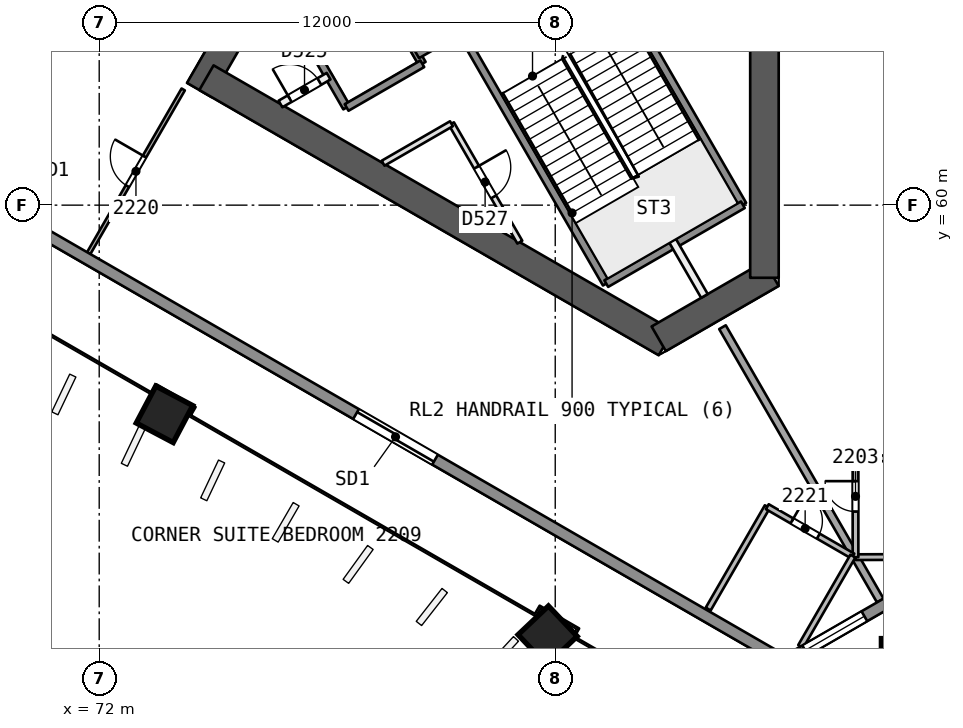
"""IFC4 building model, lengths in metres.
Left out: names, types, materials, properties, quantities, classifications, styles, units other than length and angle.
Written with IfcOpenShell. Run it as: python <this file> out.ifc"""

import sys

from ifc_helpers import new_model, si_unit, direction, frame, frame_2d, origin, origin_2d, place, context, subcontext, project, spatial, rectangle, extrude, element, fill, save


model = new_model("IFC4")
c1 = context("Model", 3, precision=1e-05, world=origin(), true_north=direction((0.0, 1.0)))
c2 = subcontext(c1, "Body", "Model", "MODEL_VIEW")
j1 = project(units=[si_unit("LENGTHUNIT", "METRE"), si_unit("PLANEANGLEUNIT", "RADIAN")], contexts=[c1])
p1 = place(None, origin())
s1 = spatial("IfcSite", under=j1, at=p1, CompositionType="ELEMENT")
p2 = place(p1, origin())
s2 = spatial("IfcBuilding", under=s1, at=p2, CompositionType="ELEMENT")
p3 = place(p2, frame((0.0, 0.0, 94.3)))
s3 = spatial("IfcBuildingStorey", under=s2, at=p3, CompositionType="ELEMENT", Elevation=94.3)
p4 = place(p3, frame((79.717, 71.831, 0.0), z_axis=(0.0, 0.0, 1.0), x_axis=(-0.499996230114, -0.866027580318, 0.0)))
e1 = element("IfcWall", 1, at=p4, inside=s3, PredefinedType="SHEAR", context=c2, shape_type="SweptSolid", body=[
    extrude(rectangle(XDim=10.164, YDim=0.75, at=frame_2d((5.082, 0.0))), origin(), (0.0, 0.0, 1.0), 3.7),
])
p5 = place(p4, frame((0.733, 0.0, 0.0)))
e2 = element("IfcOpeningElement", 2, at=p5, cuts=e1, PredefinedType="OPENING", context=c2, shape_type="SweptSolid", body=[
    extrude(rectangle(XDim=1.2, YDim=2.1, at=frame_2d((0.6, 1.05))), frame((0.0, 0.385, 0.0), z_axis=(0.0, -1.0, 0.0), x_axis=(1.0, 0.0, 0.0)), (0.0, 0.0, 1.0), 0.771),
])
p6 = place(p3, frame((74.822, 63.354, 0.0), z_axis=(0.0, 0.0, 1.0), x_axis=(0.8660248072, -0.500001033313, 0.0)))
e3 = element("IfcWall", 3, at=p6, inside=s3, PredefinedType="SHEAR", context=c2, shape_type="SweptSolid", body=[
    extrude(rectangle(XDim=13.958, YDim=0.75, at=frame_2d((6.979, 0.0))), origin(), (0.0, 0.0, 1.0), 3.7),
])
p7 = place(p3, frame((86.723, 56.483, 0.0), z_axis=(0.0, 0.0, 1.0), x_axis=(0.866017201164, 0.500014207086, 0.0)))
e4 = element("IfcWall", 4, at=p7, inside=s3, PredefinedType="SHEAR", context=c2, shape_type="SweptSolid", body=[
    extrude(rectangle(XDim=3.429, YDim=0.75, at=frame_2d((1.714, 0.0))), origin(), (0.0, 0.0, 1.0), 3.7),
])
p8 = place(p3, frame((89.505, 58.089, 0.0), z_axis=(0.0, 0.0, 1.0), x_axis=(0.0, 1.0, 0.0)))
e5 = element("IfcWall", 5, at=p8, inside=s3, PredefinedType="SHEAR", context=c2, shape_type="SweptSolid", body=[
    extrude(rectangle(XDim=14.117, YDim=0.75, at=frame_2d((7.059, 0.0))), origin(), (0.0, 0.0, 1.0), 3.7),
])
p9 = place(p3, frame((73.717, 54.469, 0.0), z_axis=(0.000857580205, 0.022758859284, 0.9997406158), x_axis=(-0.500022930451, -0.86577798761, 0.020138152677)))
e6 = element("IfcColumn", 6, at=p9, inside=s3, PredefinedType="COLUMN", context=c2, shape_type="SweptSolid", body=[
    extrude(rectangle(XDim=1.1, YDim=1.1, at=origin_2d()), origin(), (0.0, 0.0, 1.0), 3.701),
])
p10 = place(p3, frame((83.81, 48.642, 0.0), z_axis=(-0.00837646992, 0.028097450282, 0.999570091609), x_axis=(-0.49967642562, -0.865977626468, 0.020154903518)))
e7 = element("IfcColumn", 7, at=p10, inside=s3, PredefinedType="COLUMN", context=c2, shape_type="SweptSolid", body=[
    extrude(rectangle(XDim=1.1, YDim=1.1, at=origin_2d()), origin(), (0.0, 0.0, 1.0), 3.702),
])
p11 = place(p3, frame((93.903, 47.259, 0.0), z_axis=(-0.017607037296, 0.030466109479, 0.999380712447), x_axis=(0.500061328599, -0.865274797998, 0.035187946645)))
e8 = element("IfcColumn", 8, at=p11, inside=s3, PredefinedType="COLUMN", context=c2, shape_type="SweptSolid", body=[
    extrude(rectangle(XDim=2.6, YDim=2.6, at=origin_2d()), origin(), (0.0, 0.0, 1.0), 3.702),
])
p12 = place(p3, frame((94.545, 50.747, 0.0), z_axis=(0.0, 0.0, 1.0), x_axis=(-0.999994472164, -0.003325002401, 0.0)))
e9 = element("IfcWall", 9, at=p12, inside=s3, PredefinedType="PARTITIONING", context=c2, shape_type="SweptSolid", body=[
    extrude(rectangle(XDim=2.643, YDim=0.15, at=frame_2d((1.322, 0.0))), origin(), (0.0, 0.0, 1.0), 3.25),
])
p13 = place(p3, frame((91.902, 50.738, 0.0), z_axis=(0.0, 0.0, 1.0), x_axis=(0.0, 1.0, 0.0)))
e10 = element("IfcWall", 10, at=p13, inside=s3, PredefinedType="PARTITIONING", context=c2, shape_type="SweptSolid", body=[
    extrude(rectangle(XDim=2.6, YDim=0.15, at=frame_2d((1.3, 0.0))), origin(), (0.0, 0.0, 1.0), 3.25),
])
p14 = place(p13, frame((1.2, 0.0, 0.0)))
e11 = element("IfcOpeningElement", 11, at=p14, cuts=e10, PredefinedType="OPENING", context=c2, shape_type="SweptSolid", body=[
    extrude(rectangle(XDim=0.8, YDim=2.1, at=frame_2d((0.4, 1.05))), frame((0.0, 0.085, 0.0), z_axis=(0.0, -1.0, 0.0), x_axis=(1.0, 0.0, 0.0)), (0.0, 0.0, 1.0), 0.171),
])
p15 = place(p3, frame((91.902, 53.338, 0.0), z_axis=(0.0, 0.0, 1.0), x_axis=(1.0, 0.0, 0.0)))
e12 = element("IfcWall", 12, at=p15, inside=s3, PredefinedType="PARTITIONING", context=c2, shape_type="SweptSolid", body=[
    extrude(rectangle(XDim=3.11, YDim=0.15, at=frame_2d((1.555, 0.0))), origin(), (0.0, 0.0, 1.0), 3.25),
])
p16 = place(p3, frame((88.401, 56.789, 0.0), z_axis=(0.0, 0.0, 1.0), x_axis=(0.499996437432, -0.866027460624, 0.0)))
e13 = element("IfcWall", 13, at=p16, inside=s3, PredefinedType="PARTITIONING", context=c2, shape_type="SweptSolid", body=[
    extrude(rectangle(XDim=8.305, YDim=0.2, at=frame_2d((4.152, 0.0))), origin(), (0.0, 0.0, 1.0), 3.25),
])
for number, where, z_axis, x_axis in (
    (14, (64.974, 62.634, 0.0), (0.0, 0.0, 1.0), (0.5, 0.866, 0.0)),
    (15, (67.674, 61.075, 0.0), (0.0, 0.0, 1.0), (0.5, 0.866, 0.0)),
):
    element("IfcWall", number, at=place(p3, frame(where, z_axis=z_axis, x_axis=x_axis)), inside=s3, PredefinedType="PARTITIONING", context=c2, shape_type="SweptSolid", body=[
        extrude(rectangle(XDim=12.953, YDim=0.2, at=frame_2d((6.477, 0.0))), origin(), (0.0, 0.0, 1.0), 3.25),
    ])
p17 = place(p3, frame((71.724, 58.737, 0.0), z_axis=(0.0, 0.0, 1.0), x_axis=(0.499971721724, 0.866041729639, 0.0)))
e16 = element("IfcWall", 16, at=p17, inside=s3, PredefinedType="PARTITIONING", context=c2, shape_type="SweptSolid", body=[
    extrude(rectangle(XDim=4.974, YDim=0.1, at=frame_2d((2.487, 0.0))), origin(), (0.0, 0.0, 1.0), 3.25),
])
p18 = place(p17, frame((2.037, 0.0, 0.0)))
e17 = element("IfcOpeningElement", 17, at=p18, cuts=e16, PredefinedType="OPENING", context=c2, shape_type="SweptSolid", body=[
    extrude(rectangle(XDim=0.9, YDim=2.1, at=frame_2d((0.45, 1.05))), frame((0.0, 0.061, 0.0), z_axis=(0.0, -1.0, 0.0), x_axis=(1.0, 0.0, 0.0)), (0.0, 0.0, 1.0), 0.121),
])
p19 = place(p3, frame((88.025, 49.372, 0.0), z_axis=(0.0, 0.0, 1.0), x_axis=(0.500005562063, 0.866022192502, 0.0)))
e18 = element("IfcWall", 18, at=p19, inside=s3, PredefinedType="PARTITIONING", context=c2, shape_type="SweptSolid", body=[
    extrude(rectangle(XDim=3.11, YDim=0.15, at=frame_2d((1.555, 0.0))), origin(), (0.0, 0.0, 1.0), 3.25),
])
p20 = place(p3, frame((89.581, 52.066, 0.0), z_axis=(0.0, 0.0, 1.0), x_axis=(0.866021400173, -0.500006934395, 0.0)))
e19 = element("IfcWall", 19, at=p20, inside=s3, PredefinedType="PARTITIONING", context=c2, shape_type="SweptSolid", body=[
    extrude(rectangle(XDim=2.6, YDim=0.15, at=frame_2d((1.3, 0.0))), origin(), (0.0, 0.0, 1.0), 3.25),
])
p21 = place(p20, frame((0.75, 0.0, 0.0)))
e20 = element("IfcOpeningElement", 20, at=p21, cuts=e19, PredefinedType="OPENING", context=c2, shape_type="SweptSolid", body=[
    extrude(rectangle(XDim=0.8, YDim=2.1, at=frame_2d((0.4, 1.05))), frame((0.0, 0.085, 0.0), z_axis=(0.0, -1.0, 0.0), x_axis=(1.0, 0.0, 0.0)), (0.0, 0.0, 1.0), 0.171),
])
p22 = place(p3, frame((91.832, 50.766, 0.0), z_axis=(0.0, 0.0, 1.0), x_axis=(-0.500002068897, -0.866024209303, 0.0)))
e21 = element("IfcWall", 21, at=p22, inside=s3, PredefinedType="PARTITIONING", context=c2, shape_type="SweptSolid", body=[
    extrude(rectangle(XDim=2.746, YDim=0.15, at=frame_2d((1.373, 0.0))), origin(), (0.0, 0.0, 1.0), 3.25),
])
p23 = place(p3, frame((95.202, 50.954, 0.0), z_axis=(0.0, 0.0, 1.0), x_axis=(-0.866025542078, -0.499999760469, 0.0)))
e22 = element("IfcWall", 22, at=p23, inside=s3, PredefinedType="SOLIDWALL", context=c2, shape_type="SweptSolid", body=[
    extrude(rectangle(XDim=5.944, YDim=0.3, at=frame_2d((2.972, 0.0))), origin(), (0.0, 0.0, 1.0), 3.25),
])
p24 = place(p23, frame((0.671, 0.0, 0.9)))
e23 = element("IfcOpeningElement", 23, at=p24, cuts=e22, PredefinedType="OPENING", context=c2, shape_type="SweptSolid", body=[
    extrude(rectangle(XDim=1.8, YDim=1.5, at=frame_2d((0.9, 0.75))), frame((0.0, 0.161, 0.0), z_axis=(0.0, -1.0, 0.0), x_axis=(1.0, 0.0, 0.0)), (0.0, 0.0, 1.0), 0.321),
])
p25 = place(p23, frame((3.541, 0.0, 0.9)))
e24 = element("IfcOpeningElement", 24, at=p25, cuts=e22, PredefinedType="OPENING", context=c2, shape_type="SweptSolid", body=[
    extrude(rectangle(XDim=1.8, YDim=1.5, at=frame_2d((0.9, 0.75))), frame((0.0, 0.161, 0.0), z_axis=(0.0, -1.0, 0.0), x_axis=(1.0, 0.0, 0.0)), (0.0, 0.0, 1.0), 0.321),
])
p26 = place(p3, frame((90.054, 47.981, 0.0), z_axis=(0.0, 0.0, 1.0), x_axis=(-0.866025390357, 0.500000023256, 0.0)))
e25 = element("IfcWall", 25, at=p26, inside=s3, PredefinedType="SOLIDWALL", context=c2, shape_type="SweptSolid", body=[
    extrude(rectangle(XDim=58.093, YDim=0.3, at=frame_2d((29.046, 0.0))), origin(), (0.0, 0.0, 1.0), 3.25),
])
p27 = place(p26, frame((43.972, 0.0, 0.0)))
e26 = element("IfcOpeningElement", 26, at=p27, cuts=e25, PredefinedType="OPENING", context=c2, shape_type="SweptSolid", body=[
    extrude(rectangle(XDim=2.4, YDim=2.4, at=frame_2d((1.2, 1.2))), frame((0.0, 0.161, 0.0), z_axis=(0.0, -1.0, 0.0), x_axis=(1.0, 0.0, 0.0)), (0.0, 0.0, 1.0), 0.321),
])
p28 = place(p26, frame((22.39, 0.0, 0.0)))
e27 = element("IfcOpeningElement", 27, at=p28, cuts=e25, PredefinedType="OPENING", context=c2, shape_type="SweptSolid", body=[
    extrude(rectangle(XDim=2.4, YDim=2.4, at=frame_2d((1.2, 1.2))), frame((0.0, 0.161, 0.0), z_axis=(0.0, -1.0, 0.0), x_axis=(1.0, 0.0, 0.0)), (0.0, 0.0, 1.0), 0.321),
])
p29 = place(p26, frame((10.643, 0.0, 0.0)))
e28 = element("IfcOpeningElement", 28, at=p29, cuts=e25, PredefinedType="OPENING", context=c2, shape_type="SweptSolid", body=[
    extrude(rectangle(XDim=2.4, YDim=2.4, at=frame_2d((1.2, 1.2))), frame((0.0, 0.161, 0.0), z_axis=(0.0, -1.0, 0.0), x_axis=(1.0, 0.0, 0.0)), (0.0, 0.0, 1.0), 0.321),
])
p30 = place(p26, frame((29.705, 0.0, 0.9)))
e29 = element("IfcOpeningElement", 29, at=p30, cuts=e25, PredefinedType="OPENING", context=c2, shape_type="SweptSolid", body=[
    extrude(rectangle(XDim=1.8, YDim=1.5, at=frame_2d((0.9, 0.75))), frame((0.0, 0.161, 0.0), z_axis=(0.0, -1.0, 0.0), x_axis=(1.0, 0.0, 0.0)), (0.0, 0.0, 1.0), 0.321),
])
p31 = place(p26, frame((26.587, 0.0, 0.9)))
e30 = element("IfcOpeningElement", 30, at=p31, cuts=e25, PredefinedType="OPENING", context=c2, shape_type="SweptSolid", body=[
    extrude(rectangle(XDim=1.8, YDim=1.5, at=frame_2d((0.9, 0.75))), frame((0.0, 0.161, 0.0), z_axis=(0.0, -1.0, 0.0), x_axis=(1.0, 0.0, 0.0)), (0.0, 0.0, 1.0), 0.321),
])
p32 = place(p3, frame((77.135, 64.952, 0.0), z_axis=(0.0, 0.0, 1.0), x_axis=(0.499996545922, -0.866027397988, 0.0)))
e31 = element("IfcWall", 31, at=p32, inside=s3, PredefinedType="SOLIDWALL", context=c2, shape_type="SweptSolid", body=[
    extrude(rectangle(XDim=2.75, YDim=0.2, at=frame_2d((1.375, 0.0))), origin(), (0.0, 0.0, 1.0), 3.25),
])
p33 = place(p3, frame((81.269, 62.142, 0.0), z_axis=(0.0, 0.0, 1.0), x_axis=(0.500043557135, -0.866000254601, 0.0)))
e32 = element("IfcWall", 32, at=p33, inside=s3, PredefinedType="PARTITIONING", context=c2, shape_type="SweptSolid", body=[
    extrude(rectangle(XDim=3.598, YDim=0.15, at=frame_2d((1.799, 0.0))), origin(), (0.0, 0.0, 1.0), 3.25),
])
p34 = place(p33, frame((1.322, 0.0, 0.0)))
e33 = element("IfcOpeningElement", 33, at=p34, cuts=e32, PredefinedType="OPENING", context=c2, shape_type="SweptSolid", body=[
    extrude(rectangle(XDim=0.9, YDim=2.1, at=frame_2d((0.45, 1.05))), frame((0.0, 0.085, 0.0), z_axis=(0.0, -1.0, 0.0), x_axis=(1.0, 0.0, 0.0)), (0.0, 0.0, 1.0), 0.171),
])
p35 = place(p3, frame((79.127, 66.102, 0.0), z_axis=(0.0, 0.0, 1.0), x_axis=(0.499996545922, -0.866027397988, 0.0)))
e34 = element("IfcWall", 34, at=p35, inside=s3, PredefinedType="SOLIDWALL", context=c2, shape_type="SweptSolid", body=[
    extrude(rectangle(XDim=2.75, YDim=0.2, at=frame_2d((1.375, 0.0))), origin(), (0.0, 0.0, 1.0), 3.25),
])
p36 = place(p3, frame((81.493, 64.604, 0.0), z_axis=(0.0, 0.0, 1.0), x_axis=(0.500006057782, -0.866021906294, 0.0)))
e35 = element("IfcWall", 35, at=p36, inside=s3, PredefinedType="SOLIDWALL", context=c2, shape_type="SweptSolid", body=[
    extrude(rectangle(XDim=7.7, YDim=0.2, at=frame_2d((3.85, 0.0))), origin(), (0.0, 0.0, 1.0), 3.25),
])
p37 = place(p3, frame((87.09, 59.06, 0.0), z_axis=(0.0, 0.0, 1.0), x_axis=(0.499937194881, -0.866061661301, 0.0)))
e36 = element("IfcWall", 36, at=p37, inside=s3, PredefinedType="PARTITIONING", context=c2, shape_type="SweptSolid", body=[
    extrude(rectangle(XDim=1.673, YDim=0.2, at=frame_2d((0.836, 0.0))), origin(), (0.0, 0.0, 1.0), 3.25),
])
p38 = place(p3, frame((85.087, 66.679, 0.0), z_axis=(0.0, 0.0, 1.0), x_axis=(0.500019787375, -0.866013979237, 0.0)))
e37 = element("IfcWall", 37, at=p38, inside=s3, PredefinedType="SOLIDWALL", context=c2, shape_type="SweptSolid", body=[
    extrude(rectangle(XDim=7.7, YDim=0.2, at=frame_2d((3.85, 0.0))), origin(), (0.0, 0.0, 1.0), 3.25),
])
p39 = place(p38, frame((0.55, 0.0, 0.0)))
e38 = element("IfcOpeningElement", 38, at=p39, cuts=e37, PredefinedType="OPENING", context=c2, shape_type="SweptSolid", body=[
    extrude(rectangle(XDim=1.1, YDim=2.1, at=frame_2d((0.55, 1.05))), frame((0.0, 0.11, 0.0), z_axis=(0.0, -1.0, 0.0), x_axis=(1.0, 0.0, 0.0)), (0.0, 0.0, 1.0), 0.221),
])
p40 = place(p3, frame((76.77, 62.662, 0.0), z_axis=(0.0, 0.0, 1.0), x_axis=(0.866054810376, 0.49994906283, 0.0)))
e39 = element("IfcWall", 39, at=p40, inside=s3, PredefinedType="PARTITIONING", context=c2, shape_type="SweptSolid", body=[
    extrude(rectangle(XDim=1.461, YDim=0.2, at=frame_2d((0.73, 0.0))), origin(), (0.0, 0.0, 1.0), 3.25),
])
p41 = place(p40, frame((0.281, 0.0, 0.0)))
e40 = element("IfcOpeningElement", 40, at=p41, cuts=e39, PredefinedType="OPENING", context=c2, shape_type="SweptSolid", body=[
    extrude(rectangle(XDim=0.9, YDim=2.1, at=frame_2d((0.45, 1.05))), frame((0.0, 0.11, 0.0), z_axis=(0.0, -1.0, 0.0), x_axis=(1.0, 0.0, 0.0)), (0.0, 0.0, 1.0), 0.221),
])
p42 = place(p3, frame((80.367, 63.954, 0.0), z_axis=(0.0, 0.0, 1.0), x_axis=(0.866026575979, 0.499997969693, 0.0)))
e41 = element("IfcWall", 41, at=p42, inside=s3, PredefinedType="SOLIDWALL", context=c2, shape_type="SweptSolid", body=[
    extrude(rectangle(XDim=6.75, YDim=0.2, at=frame_2d((3.375, 0.0))), origin(), (0.0, 0.0, 1.0), 3.25),
])
p43 = place(p3, frame((78.51, 62.57, 0.0), z_axis=(0.0, 0.0, 1.0), x_axis=(0.866053019151, 0.499952165731, 0.0)))
e42 = element("IfcWall", 42, at=p43, inside=s3, PredefinedType="SOLIDWALL", context=c2, shape_type="SweptSolid", body=[
    extrude(rectangle(XDim=2.3, YDim=0.2, at=frame_2d((1.15, 0.0))), origin(), (0.0, 0.0, 1.0), 3.25),
])
p44 = place(p3, frame((79.47, 61.103, 0.0), z_axis=(0.0, 0.0, 1.0), x_axis=(0.866021168401, 0.500007335828, 0.0)))
e43 = element("IfcWall", 43, at=p44, inside=s3, PredefinedType="PARTITIONING", context=c2, shape_type="SweptSolid", body=[
    extrude(rectangle(XDim=2.077, YDim=0.15, at=frame_2d((1.039, 0.0))), origin(), (0.0, 0.0, 1.0), 3.25),
])
p45 = place(p3, frame((85.343, 57.935, 0.0), z_axis=(0.0, 0.0, 1.0), x_axis=(0.866004344652, 0.500036473714, 0.0)))
e44 = element("IfcWall", 44, at=p45, inside=s3, PredefinedType="SOLIDWALL", context=c2, shape_type="SweptSolid", body=[
    extrude(rectangle(XDim=4.15, YDim=0.2, at=frame_2d((2.075, 0.0))), origin(), (0.0, 0.0, 1.0), 3.25),
])
p46 = place(p14, origin())
e45 = element("IfcDoor", 45, at=p46, inside=s3, OperationType="SINGLE_SWING_RIGHT", PredefinedType="NOTDEFINED", context=c2, shape_type="SweptSolid", body=[
    extrude(rectangle(XDim=0.8, YDim=2.1, at=frame_2d((0.4, 1.05))), frame((0.0, 0.025, 0.0), z_axis=(0.0, -1.0, 0.0), x_axis=(1.0, 0.0, 0.0)), (0.0, 0.0, 1.0), 0.05),
])
fill(e11, e45)
p47 = place(p18, origin())
e46 = element("IfcDoor", 46, at=p47, inside=s3, OperationType="SINGLE_SWING_RIGHT", PredefinedType="NOTDEFINED", context=c2, shape_type="SweptSolid", body=[
    extrude(rectangle(XDim=0.9, YDim=2.1, at=frame_2d((0.45, 1.05))), frame((0.0, 0.025, 0.0), z_axis=(0.0, -1.0, 0.0), x_axis=(1.0, 0.0, 0.0)), (0.0, 0.0, 1.0), 0.05),
])
fill(e17, e46)
p48 = place(p21, origin())
e47 = element("IfcDoor", 47, at=p48, inside=s3, OperationType="SINGLE_SWING_LEFT", PredefinedType="NOTDEFINED", context=c2, shape_type="SweptSolid", body=[
    extrude(rectangle(XDim=0.8, YDim=2.1, at=frame_2d((0.4, 1.05))), frame((0.0, 0.025, 0.0), z_axis=(0.0, -1.0, 0.0), x_axis=(1.0, 0.0, 0.0)), (0.0, 0.0, 1.0), 0.05),
])
fill(e20, e47)
p49 = place(p25, origin())
e48 = element("IfcWindow", 48, at=p49, inside=s3, PartitioningType="SINGLE_PANEL", PredefinedType="WINDOW", context=c2, shape_type="SweptSolid", body=[
    extrude(rectangle(XDim=1.8, YDim=1.5, at=frame_2d((0.9, 0.75))), frame((0.0, 0.03, 0.0), z_axis=(0.0, -1.0, 0.0), x_axis=(1.0, 0.0, 0.0)), (0.0, 0.0, 1.0), 0.06),
])
fill(e24, e48)
p50 = place(p29, origin())
e49 = element("IfcDoor", 49, at=p50, inside=s3, OperationType="SLIDING_TO_LEFT", PredefinedType="NOTDEFINED", context=c2, shape_type="SweptSolid", body=[
    extrude(rectangle(XDim=2.4, YDim=2.4, at=frame_2d((1.2, 1.2))), frame((0.0, 0.025, 0.0), z_axis=(0.0, -1.0, 0.0), x_axis=(1.0, 0.0, 0.0)), (0.0, 0.0, 1.0), 0.05),
])
fill(e28, e49)
p51 = place(p41, origin())
e50 = element("IfcDoor", 50, at=p51, inside=s3, OperationType="SINGLE_SWING_LEFT", PredefinedType="NOTDEFINED", context=c2, shape_type="SweptSolid", body=[
    extrude(rectangle(XDim=0.9, YDim=2.1, at=frame_2d((0.45, 1.05))), frame((0.0, 0.025, 0.0), z_axis=(0.0, -1.0, 0.0), x_axis=(1.0, 0.0, 0.0)), (0.0, 0.0, 1.0), 0.05),
])
fill(e40, e50)
p52 = place(p34, origin())
e51 = element("IfcDoor", 51, at=p52, inside=s3, OperationType="SINGLE_SWING_LEFT", PredefinedType="NOTDEFINED", context=c2, shape_type="SweptSolid", body=[
    extrude(rectangle(XDim=0.9, YDim=2.1, at=frame_2d((0.45, 1.05))), frame((0.0, 0.025, 0.0), z_axis=(0.0, -1.0, 0.0), x_axis=(1.0, 0.0, 0.0)), (0.0, 0.0, 1.0), 0.05),
])
fill(e33, e51)
save(model, sys.argv[1])
